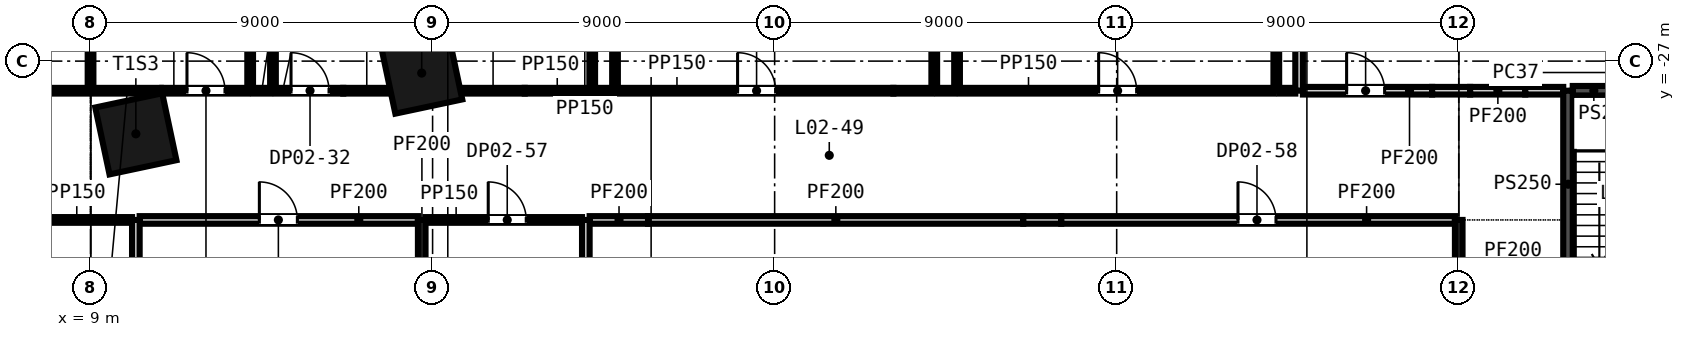
"""IFC4 building model, lengths in metres.
Left out: names, types, materials, properties, quantities, classifications, styles, units other than length and angle.
Written with IfcOpenShell. Run it as: python <this file> out.ifc"""

import sys

from ifc_helpers import new_model, si_unit, direction, frame, frame_2d, origin, origin_2d, place, context, subcontext, project, spatial, rectangle, extrude, element, fill, save


model = new_model("IFC4")
c1 = context("Model", 3, precision=1e-05, world=origin(), true_north=direction((0.0, 1.0)))
c2 = subcontext(c1, "Body", "Model", "MODEL_VIEW")
j1 = project(units=[si_unit("LENGTHUNIT", "METRE"), si_unit("PLANEANGLEUNIT", "RADIAN")], contexts=[c1])
p1 = place(None, origin())
s1 = spatial("IfcSite", under=j1, at=p1, CompositionType="ELEMENT")
p2 = place(p1, origin())
s2 = spatial("IfcBuilding", under=s1, at=p2, CompositionType="ELEMENT")
p3 = place(p2, frame((0.0, 0.0, 18.0)))
s3 = spatial("IfcBuildingStorey", under=s2, at=p3, CompositionType="ELEMENT", Elevation=18.0)
for number, where, z_axis, x_axis in (
    (1, (10.192, -28.914, -0.4), (0.0, 0.0, 1.0), (0.978, 0.208, 0.0)),
    (2, (17.714, -27.315, -0.4), (0.0, 0.0, 1.0), (0.978, 0.208, 0.0)),
):
    element("IfcColumn", number, at=place(p3, frame(where, z_axis=z_axis, x_axis=x_axis)), inside=s3, PredefinedType="COLUMN", context=c2, shape_type="SweptSolid", body=[
        extrude(rectangle(XDim=1.8, YDim=1.8, at=origin_2d()), origin(), (0.0, 0.0, 1.0), 4.6),
    ])
p4 = place(p3, frame((4.223, -31.179, 0.0), z_axis=(0.0, 0.0, 1.0), x_axis=(1.0, 0.0, 0.0)))
e3 = element("IfcWall", 3, at=p4, inside=s3, PredefinedType="PARTITIONING", context=c2, shape_type="SweptSolid", body=[
    extrude(rectangle(XDim=5.869, YDim=0.15, at=frame_2d((2.935, 0.0))), origin(), (0.0, 0.0, 1.0), 4.2),
])
p5 = place(p4, frame((1.9, 0.0, 0.0)))
e4 = element("IfcOpeningElement", 4, at=p5, cuts=e3, PredefinedType="OPENING", context=c2, shape_type="SweptSolid", body=[
    extrude(rectangle(XDim=1.0, YDim=2.1, at=frame_2d((0.5, 1.05))), frame((0.0, 0.085, 0.0), z_axis=(0.0, -1.0, 0.0), x_axis=(1.0, 0.0, 0.0)), (0.0, 0.0, 1.0), 0.17),
])
p6 = place(p3, frame((10.292, -31.179, 0.0), z_axis=(0.0, 0.0, 1.0), x_axis=(1.0, 0.0, 0.0)))
e5 = element("IfcWall", 5, at=p6, inside=s3, PredefinedType="PARTITIONING", context=c2, shape_type="SweptSolid", body=[
    extrude(rectangle(XDim=7.322, YDim=0.2, at=frame_2d((3.661, 0.0))), origin(), (0.0, 0.0, 1.0), 4.2),
])
p7 = place(p6, frame((3.15, 0.0, 0.0)))
e6 = element("IfcOpeningElement", 6, at=p7, cuts=e5, PredefinedType="OPENING", context=c2, shape_type="SweptSolid", body=[
    extrude(rectangle(XDim=1.0, YDim=2.1, at=frame_2d((0.5, 1.05))), frame((0.0, 0.11, 0.0), z_axis=(0.0, -1.0, 0.0), x_axis=(1.0, 0.0, 0.0)), (0.0, 0.0, 1.0), 0.22),
])
p8 = place(p3, frame((17.814, -31.179, 0.0), z_axis=(0.0, 0.0, 1.0), x_axis=(1.0, 0.0, 0.0)))
e7 = element("IfcWall", 7, at=p8, inside=s3, PredefinedType="PARTITIONING", context=c2, shape_type="SweptSolid", body=[
    extrude(rectangle(XDim=4.118, YDim=0.15, at=frame_2d((2.059, 0.0))), origin(), (0.0, 0.0, 1.0), 4.2),
])
p9 = place(p8, frame((1.65, 0.0, 0.0)))
e8 = element("IfcOpeningElement", 8, at=p9, cuts=e7, PredefinedType="OPENING", context=c2, shape_type="SweptSolid", body=[
    extrude(rectangle(XDim=1.0, YDim=2.1, at=frame_2d((0.5, 1.05))), frame((0.0, 0.085, 0.0), z_axis=(0.0, -1.0, 0.0), x_axis=(1.0, 0.0, 0.0)), (0.0, 0.0, 1.0), 0.17),
])
p10 = place(p3, frame((22.132, -31.179, 0.0), z_axis=(0.0, 0.0, 1.0), x_axis=(1.0, 0.0, 0.0)))
e9 = element("IfcWall", 9, at=p10, inside=s3, PredefinedType="PARTITIONING", context=c2, shape_type="SweptSolid", body=[
    extrude(rectangle(XDim=1.537, YDim=0.2, at=frame_2d((0.769, 0.0))), origin(), (0.0, 0.0, 1.0), 3.111),
])
p11 = place(p3, frame((23.669, -31.179, 0.0), z_axis=(0.0, 0.0, 1.0), x_axis=(1.0, 0.0, 0.0)))
e10 = element("IfcWall", 10, at=p11, inside=s3, PredefinedType="PARTITIONING", context=c2, shape_type="SweptSolid", body=[
    extrude(rectangle(XDim=9.873, YDim=0.2, at=frame_2d((4.937, 0.0))), origin(), (0.0, 0.0, 1.0), 4.2),
])
p12 = place(p3, frame((33.542, -31.179, 0.0), z_axis=(0.0, 0.0, 1.0), x_axis=(1.0, 0.0, 0.0)))
e11 = element("IfcWall", 11, at=p12, inside=s3, PredefinedType="PARTITIONING", context=c2, shape_type="SweptSolid", body=[
    extrude(rectangle(XDim=1.0, YDim=0.2, at=frame_2d((0.5, 0.0))), origin(), (0.0, 0.0, 1.0), 3.111),
])
p13 = place(p3, frame((34.542, -31.179, 0.0), z_axis=(0.0, 0.0, 1.0), x_axis=(1.0, 0.0, 0.0)))
e12 = element("IfcWall", 12, at=p13, inside=s3, PredefinedType="PARTITIONING", context=c2, shape_type="SweptSolid", body=[
    extrude(rectangle(XDim=10.358, YDim=0.2, at=frame_2d((5.179, 0.0))), origin(), (0.0, 0.0, 1.0), 4.2),
])
p14 = place(p13, frame((4.65, 0.0, 0.0)))
e13 = element("IfcOpeningElement", 13, at=p14, cuts=e12, PredefinedType="OPENING", context=c2, shape_type="SweptSolid", body=[
    extrude(rectangle(XDim=1.0, YDim=2.1, at=frame_2d((0.5, 1.05))), frame((0.0, 0.11, 0.0), z_axis=(0.0, -1.0, 0.0), x_axis=(1.0, 0.0, 0.0)), (0.0, 0.0, 1.0), 0.22),
])
p15 = place(p3, frame((0.75, -27.779, 0.0), z_axis=(0.0, 0.0, 1.0), x_axis=(1.0, 0.0, 0.0)))
e14 = element("IfcWall", 14, at=p15, inside=s3, PredefinedType="PARTITIONING", context=c2, shape_type="SweptSolid", body=[
    extrude(rectangle(XDim=8.175, YDim=0.15, at=frame_2d((4.087, 0.0))), origin(), (0.0, 0.0, 1.0), 4.2),
])
p16 = place(p3, frame((9.075, -27.779, 0.0), z_axis=(0.0, 0.0, 1.0), x_axis=(1.0, 0.0, 0.0)))
e15 = element("IfcWall", 15, at=p16, inside=s3, PredefinedType="PARTITIONING", context=c2, shape_type="SweptSolid", body=[
    extrude(rectangle(XDim=1.773, YDim=0.15, at=frame_2d((0.886, 0.0))), origin(), (0.0, 0.0, 1.0), 4.2),
])
p17 = place(p3, frame((10.887, -27.779, 0.0), z_axis=(0.0, 0.0, 1.0), x_axis=(1.0, 0.0, 0.0)))
e16 = element("IfcWall", 16, at=p17, inside=s3, PredefinedType="PARTITIONING", context=c2, shape_type="SweptSolid", body=[
    extrude(rectangle(XDim=2.238, YDim=0.15, at=frame_2d((1.119, 0.0))), origin(), (0.0, 0.0, 1.0), 4.2),
])
p18 = place(p17, frame((0.65, 0.0, 0.0)))
e17 = element("IfcOpeningElement", 17, at=p18, cuts=e16, PredefinedType="OPENING", context=c2, shape_type="SweptSolid", body=[
    extrude(rectangle(XDim=1.0, YDim=2.1, at=frame_2d((0.5, 1.05))), frame((0.0, 0.085, 0.0), z_axis=(0.0, -1.0, 0.0), x_axis=(1.0, 0.0, 0.0)), (0.0, 0.0, 1.0), 0.17),
])
p19 = place(p3, frame((13.275, -27.779, 0.0), z_axis=(0.0, 0.0, 1.0), x_axis=(1.0, 0.0, 0.0)))
e18 = element("IfcWall", 18, at=p19, inside=s3, PredefinedType="PARTITIONING", context=c2, shape_type="SweptSolid", body=[
    extrude(rectangle(XDim=0.45, YDim=0.15, at=frame_2d((0.225, 0.0))), origin(), (0.0, 0.0, 1.0), 4.2),
])
p20 = place(p3, frame((13.875, -27.779, 0.0), z_axis=(0.0, 0.0, 1.0), x_axis=(1.0, 0.0, 0.0)))
e19 = element("IfcWall", 19, at=p20, inside=s3, PredefinedType="PARTITIONING", context=c2, shape_type="SweptSolid", body=[
    extrude(rectangle(XDim=1.775, YDim=0.15, at=frame_2d((0.887, 0.0))), origin(), (0.0, 0.0, 1.0), 4.2),
])
p21 = place(p20, frame((0.4, 0.0, 0.0)))
e20 = element("IfcOpeningElement", 20, at=p21, cuts=e19, PredefinedType="OPENING", context=c2, shape_type="SweptSolid", body=[
    extrude(rectangle(XDim=1.0, YDim=2.1, at=frame_2d((0.5, 1.05))), frame((0.0, 0.085, 0.0), z_axis=(0.0, -1.0, 0.0), x_axis=(1.0, 0.0, 0.0)), (0.0, 0.0, 1.0), 0.17),
])
p22 = place(p3, frame((15.65, -27.779, 0.0), z_axis=(0.0, 0.0, 1.0), x_axis=(1.0, 0.0, 0.0)))
e21 = element("IfcWall", 21, at=p22, inside=s3, PredefinedType="PARTITIONING", context=c2, shape_type="SweptSolid", body=[
    extrude(rectangle(XDim=1.227, YDim=0.15, at=frame_2d((0.613, 0.0))), origin(), (0.0, 0.0, 1.0), 3.2),
])
p23 = place(p3, frame((18.748, -27.779, 0.0), z_axis=(0.0, 0.0, 1.0), x_axis=(1.0, 0.0, 0.0)))
e22 = element("IfcWall", 22, at=p23, inside=s3, PredefinedType="PARTITIONING", context=c2, shape_type="SweptSolid", body=[
    extrude(rectangle(XDim=1.676, YDim=0.15, at=frame_2d((0.838, 0.0))), origin(), (0.0, 0.0, 1.0), 4.2),
])
p24 = place(p3, frame((20.425, -27.779, 0.0), z_axis=(0.0, 0.0, 1.0), x_axis=(1.0, 0.0, 0.0)))
e23 = element("IfcWall", 23, at=p24, inside=s3, PredefinedType="PARTITIONING", context=c2, shape_type="SweptSolid", body=[
    extrude(rectangle(XDim=1.7, YDim=0.15, at=frame_2d((0.85, 0.0))), origin(), (0.0, 0.0, 1.0), 3.111),
])
p25 = place(p3, frame((22.275, -27.779, 0.0), z_axis=(0.0, 0.0, 1.0), x_axis=(1.0, 0.0, 0.0)))
e24 = element("IfcWall", 24, at=p25, inside=s3, PredefinedType="PARTITIONING", context=c2, shape_type="SweptSolid", body=[
    extrude(rectangle(XDim=0.45, YDim=0.15, at=frame_2d((0.225, 0.0))), origin(), (0.0, 0.0, 1.0), 4.2),
])
p26 = place(p3, frame((22.875, -27.779, 0.0), z_axis=(0.0, 0.0, 1.0), x_axis=(1.0, 0.0, 0.0)))
e25 = element("IfcWall", 25, at=p26, inside=s3, PredefinedType="PARTITIONING", context=c2, shape_type="SweptSolid", body=[
    extrude(rectangle(XDim=7.25, YDim=0.15, at=frame_2d((3.625, 0.0))), origin(), (0.0, 0.0, 1.0), 4.2),
])
p27 = place(p26, frame((3.15, 0.0, 0.0)))
e26 = element("IfcOpeningElement", 26, at=p27, cuts=e25, PredefinedType="OPENING", context=c2, shape_type="SweptSolid", body=[
    extrude(rectangle(XDim=1.0, YDim=2.1, at=frame_2d((0.5, 1.05))), frame((0.0, 0.085, 0.0), z_axis=(0.0, -1.0, 0.0), x_axis=(1.0, 0.0, 0.0)), (0.0, 0.0, 1.0), 0.17),
])
p28 = place(p3, frame((30.125, -27.779, 0.0), z_axis=(0.0, 0.0, 1.0), x_axis=(1.0, 0.0, 0.0)))
e27 = element("IfcWall", 27, at=p28, inside=s3, PredefinedType="PARTITIONING", context=c2, shape_type="SweptSolid", body=[
    extrude(rectangle(XDim=1.0, YDim=0.15, at=frame_2d((0.5, 0.0))), origin(), (0.0, 0.0, 1.0), 3.111),
])
p29 = place(p3, frame((31.275, -27.779, 0.0), z_axis=(0.0, 0.0, 1.0), x_axis=(1.0, 0.0, 0.0)))
e28 = element("IfcWall", 28, at=p29, inside=s3, PredefinedType="PARTITIONING", context=c2, shape_type="SweptSolid", body=[
    extrude(rectangle(XDim=0.45, YDim=0.15, at=frame_2d((0.225, 0.0))), origin(), (0.0, 0.0, 1.0), 4.2),
])
p30 = place(p3, frame((31.875, -27.779, 0.0), z_axis=(0.0, 0.0, 1.0), x_axis=(1.0, 0.0, 0.0)))
e29 = element("IfcWall", 29, at=p30, inside=s3, PredefinedType="PARTITIONING", context=c2, shape_type="SweptSolid", body=[
    extrude(rectangle(XDim=8.25, YDim=0.15, at=frame_2d((4.125, 0.0))), origin(), (0.0, 0.0, 1.0), 4.2),
])
p31 = place(p30, frame((3.65, 0.0, 0.0)))
e30 = element("IfcOpeningElement", 30, at=p31, cuts=e29, PredefinedType="OPENING", context=c2, shape_type="SweptSolid", body=[
    extrude(rectangle(XDim=1.0, YDim=2.1, at=frame_2d((0.5, 1.05))), frame((0.0, 0.085, 0.0), z_axis=(0.0, -1.0, 0.0), x_axis=(1.0, 0.0, 0.0)), (0.0, 0.0, 1.0), 0.17),
])
p32 = place(p3, frame((40.275, -27.779, 0.0), z_axis=(0.0, 0.0, 1.0), x_axis=(1.0, 0.0, 0.0)))
e31 = element("IfcWall", 31, at=p32, inside=s3, PredefinedType="PARTITIONING", context=c2, shape_type="SweptSolid", body=[
    extrude(rectangle(XDim=0.425, YDim=0.15, at=frame_2d((0.212, 0.0))), origin(), (0.0, 0.0, 1.0), 4.2),
])
p33 = place(p3, frame((40.9, -27.779, 0.0), z_axis=(0.0, 0.0, 1.0), x_axis=(1.0, 0.0, 0.0)))
e32 = element("IfcWall", 32, at=p33, inside=s3, PredefinedType="PARTITIONING", context=c2, shape_type="SweptSolid", body=[
    extrude(rectangle(XDim=3.4, YDim=0.2, at=frame_2d((1.7, 0.0))), origin(), (0.0, 0.0, 1.0), 4.2),
])
p34 = place(p33, frame((1.15, 0.0, 0.0)))
e33 = element("IfcOpeningElement", 33, at=p34, cuts=e32, PredefinedType="OPENING", context=c2, shape_type="SweptSolid", body=[
    extrude(rectangle(XDim=1.0, YDim=2.1, at=frame_2d((0.5, 1.05))), frame((0.0, 0.11, 0.0), z_axis=(0.0, -1.0, 0.0), x_axis=(1.0, 0.0, 0.0)), (0.0, 0.0, 1.0), 0.22),
])
p35 = place(p3, frame((44.3, -27.779, 0.0), z_axis=(0.0, 0.0, 1.0), x_axis=(1.0, 0.0, 0.0)))
e34 = element("IfcWall", 34, at=p35, inside=s3, PredefinedType="PARTITIONING", context=c2, shape_type="SweptSolid", body=[
    extrude(rectangle(XDim=1.0, YDim=0.2, at=frame_2d((0.5, 0.0))), origin(), (0.0, 0.0, 1.0), 3.597),
])
p36 = place(p3, frame((45.3, -27.779, 0.0), z_axis=(0.0, 0.0, 1.0), x_axis=(1.0, 0.0, 0.0)))
e35 = element("IfcWall", 35, at=p36, inside=s3, PredefinedType="PARTITIONING", context=c2, shape_type="SweptSolid", body=[
    extrude(rectangle(XDim=1.45, YDim=0.2, at=frame_2d((0.725, 0.0))), origin(), (0.0, 0.0, 1.0), 4.2),
])
p37 = place(p3, frame((46.75, -27.779, 0.0), z_axis=(0.0, 0.0, 1.0), x_axis=(1.0, 0.0, 0.0)))
e36 = element("IfcWall", 36, at=p37, inside=s3, PredefinedType="PARTITIONING", context=c2, shape_type="SweptSolid", body=[
    extrude(rectangle(XDim=1.0, YDim=0.2, at=frame_2d((0.5, 0.0))), origin(), (0.0, 0.0, 1.0), 3.667),
])
p38 = place(p3, frame((48.0, -27.779, 0.0), z_axis=(0.0, 0.0, 1.0), x_axis=(1.0, 0.0, 0.0)))
e37 = element("IfcWall", 37, at=p38, inside=s3, PredefinedType="SHEAR", context=c2, shape_type="SweptSolid", body=[
    extrude(rectangle(XDim=1.1, YDim=0.25, at=frame_2d((0.55, 0.0))), origin(), (0.0, 0.0, 1.0), 4.2),
])
p39 = place(p3, frame((9.0, -27.778, 0.0), z_axis=(0.0, 0.0, 1.0), x_axis=(0.0, 1.0, 0.0)))
e38 = element("IfcWall", 38, at=p39, inside=s3, PredefinedType="PARTITIONING", context=c2, shape_type="SweptSolid", body=[
    extrude(rectangle(XDim=3.825, YDim=0.15, at=frame_2d((1.913, 0.0))), origin(), (0.0, 0.0, 1.0), 4.2),
])
p40 = place(p3, frame((10.192, -40.4, 0.0), z_axis=(0.0, 0.0, 1.0), x_axis=(0.0, 1.0, 0.0)))
e39 = element("IfcWall", 39, at=p40, inside=s3, PredefinedType="PARTITIONING", context=c2, shape_type="SweptSolid", body=[
    extrude(rectangle(XDim=9.221, YDim=0.2, at=frame_2d((4.61, 0.0))), origin(), (0.0, 0.0, 1.0), 4.2),
])
for number, where, z_axis, x_axis in (
    (40, (13.2, -27.778, 0.0), (0.0, 0.0, 1.0), (0.0, 1.0, 0.0)),
    (41, (13.8, -27.778, 0.0), (0.0, 0.0, 1.0), (0.0, 1.0, 0.0)),
):
    element("IfcWall", number, at=place(p3, frame(where, z_axis=z_axis, x_axis=x_axis)), inside=s3, PredefinedType="PARTITIONING", context=c2, shape_type="SweptSolid", body=[
        extrude(rectangle(XDim=1.578, YDim=0.15, at=frame_2d((0.789, 0.0))), origin(), (0.0, 0.0, 1.0), 4.2),
    ])
p41 = place(p3, frame((17.714, -37.835, 0.0), z_axis=(0.0, 0.0, 1.0), x_axis=(0.0, 1.0, 0.0)))
e42 = element("IfcWall", 42, at=p41, inside=s3, PredefinedType="PARTITIONING", context=c2, shape_type="SweptSolid", body=[
    extrude(rectangle(XDim=6.656, YDim=0.2, at=frame_2d((3.328, 0.0))), origin(), (0.0, 0.0, 1.0), 4.2),
])
p42 = place(p3, frame((22.032, -40.4, 0.0), z_axis=(0.0, 0.0, 1.0), x_axis=(0.0, 1.0, 0.0)))
e43 = element("IfcWall", 43, at=p42, inside=s3, PredefinedType="PARTITIONING", context=c2, shape_type="SweptSolid", body=[
    extrude(rectangle(XDim=9.221, YDim=0.2, at=frame_2d((4.61, 0.0))), origin(), (0.0, 0.0, 1.0), 4.2),
])
for number, where, z_axis, x_axis in (
    (44, (22.2, -27.778, 0.0), (0.0, 0.0, 1.0), (0.0, 1.0, 0.0)),
    (45, (22.8, -27.778, 0.0), (0.0, 0.0, 1.0), (0.0, 1.0, 0.0)),
    (46, (31.2, -27.778, 0.0), (0.0, 0.0, 1.0), (0.0, 1.0, 0.0)),
    (47, (31.8, -27.778, 0.0), (0.0, 0.0, 1.0), (0.0, 1.0, 0.0)),
    (48, (40.2, -27.778, 0.0), (0.0, 0.0, 1.0), (0.0, 1.0, 0.0)),
):
    element("IfcWall", number, at=place(p3, frame(where, z_axis=z_axis, x_axis=x_axis)), inside=s3, PredefinedType="PARTITIONING", context=c2, shape_type="SweptSolid", body=[
        extrude(rectangle(XDim=1.578, YDim=0.15, at=frame_2d((0.789, 0.0))), origin(), (0.0, 0.0, 1.0), 4.2),
    ])
p43 = place(p3, frame((40.8, -27.778, 0.0), z_axis=(0.0, 0.0, 1.0), x_axis=(0.0, 1.0, 0.0)))
e49 = element("IfcWall", 49, at=p43, inside=s3, PredefinedType="PARTITIONING", context=c2, shape_type="SweptSolid", body=[
    extrude(rectangle(XDim=1.578, YDim=0.2, at=frame_2d((0.789, 0.0))), origin(), (0.0, 0.0, 1.0), 4.2),
])
p44 = place(p3, frame((45.0, -34.6, 0.0), z_axis=(0.0, 0.0, 1.0), x_axis=(0.0, 1.0, 0.0)))
e50 = element("IfcWall", 50, at=p44, inside=s3, PredefinedType="PARTITIONING", context=c2, shape_type="SweptSolid", body=[
    extrude(rectangle(XDim=3.421, YDim=0.2, at=frame_2d((1.71, 0.0))), origin(), (0.0, 0.0, 1.0), 4.2),
])
p45 = place(p3, frame((47.875, -34.6, 0.0), z_axis=(0.0, 0.0, 1.0), x_axis=(0.0, 1.0, 0.0)))
e51 = element("IfcWall", 51, at=p45, inside=s3, PredefinedType="SHEAR", context=c2, shape_type="SweptSolid", body=[
    extrude(rectangle(XDim=6.821, YDim=0.25, at=frame_2d((3.411, 0.0))), origin(), (0.0, 0.0, 1.0), 4.2),
])
p46 = place(p45, frame((0.65, 0.0, 0.0)))
e52 = element("IfcOpeningElement", 52, at=p46, cuts=e51, PredefinedType="OPENING", context=c2, shape_type="SweptSolid", body=[
    extrude(rectangle(XDim=1.2, YDim=2.1, at=frame_2d((0.6, 1.05))), frame((0.0, 0.135, 0.0), z_axis=(0.0, -1.0, 0.0), x_axis=(1.0, 0.0, 0.0)), (0.0, 0.0, 1.0), 0.27),
])
p47 = place(p18, origin())
e53 = element("IfcDoor", 53, at=p47, inside=s3, OperationType="SINGLE_SWING_LEFT", PredefinedType="DOOR", context=c2, shape_type="SweptSolid", body=[
    extrude(rectangle(XDim=1.0, YDim=2.1, at=frame_2d((0.5, 1.05))), frame((0.0, 0.025, 0.0), z_axis=(0.0, -1.0, 0.0), x_axis=(1.0, 0.0, 0.0)), (0.0, 0.0, 1.0), 0.05),
])
fill(e17, e53)
p48 = place(p21, origin())
e54 = element("IfcDoor", 54, at=p48, inside=s3, OperationType="SINGLE_SWING_LEFT", PredefinedType="DOOR", context=c2, shape_type="SweptSolid", body=[
    extrude(rectangle(XDim=1.0, YDim=2.1, at=frame_2d((0.5, 1.05))), frame((0.0, 0.025, 0.0), z_axis=(0.0, -1.0, 0.0), x_axis=(1.0, 0.0, 0.0)), (0.0, 0.0, 1.0), 0.05),
])
fill(e20, e54)
p49 = place(p27, origin())
e55 = element("IfcDoor", 55, at=p49, inside=s3, OperationType="SINGLE_SWING_LEFT", PredefinedType="DOOR", context=c2, shape_type="SweptSolid", body=[
    extrude(rectangle(XDim=1.0, YDim=2.1, at=frame_2d((0.5, 1.05))), frame((0.0, 0.025, 0.0), z_axis=(0.0, -1.0, 0.0), x_axis=(1.0, 0.0, 0.0)), (0.0, 0.0, 1.0), 0.05),
])
fill(e26, e55)
p50 = place(p31, origin())
e56 = element("IfcDoor", 56, at=p50, inside=s3, OperationType="SINGLE_SWING_LEFT", PredefinedType="DOOR", context=c2, shape_type="SweptSolid", body=[
    extrude(rectangle(XDim=1.0, YDim=2.1, at=frame_2d((0.5, 1.05))), frame((0.0, 0.025, 0.0), z_axis=(0.0, -1.0, 0.0), x_axis=(1.0, 0.0, 0.0)), (0.0, 0.0, 1.0), 0.05),
])
fill(e30, e56)
p51 = place(p34, origin())
e57 = element("IfcDoor", 57, at=p51, inside=s3, OperationType="SINGLE_SWING_LEFT", PredefinedType="DOOR", context=c2, shape_type="SweptSolid", body=[
    extrude(rectangle(XDim=1.0, YDim=2.1, at=frame_2d((0.5, 1.05))), frame((0.0, 0.025, 0.0), z_axis=(0.0, -1.0, 0.0), x_axis=(1.0, 0.0, 0.0)), (0.0, 0.0, 1.0), 0.05),
])
fill(e33, e57)
p52 = place(p7, origin())
e58 = element("IfcDoor", 58, at=p52, inside=s3, OperationType="SINGLE_SWING_LEFT", PredefinedType="DOOR", context=c2, shape_type="SweptSolid", body=[
    extrude(rectangle(XDim=1.0, YDim=2.1, at=frame_2d((0.5, 1.05))), frame((0.0, 0.025, 0.0), z_axis=(0.0, -1.0, 0.0), x_axis=(1.0, 0.0, 0.0)), (0.0, 0.0, 1.0), 0.05),
])
fill(e6, e58)
p53 = place(p9, origin())
e59 = element("IfcDoor", 59, at=p53, inside=s3, OperationType="SINGLE_SWING_LEFT", PredefinedType="DOOR", context=c2, shape_type="SweptSolid", body=[
    extrude(rectangle(XDim=1.0, YDim=2.1, at=frame_2d((0.5, 1.05))), frame((0.0, 0.025, 0.0), z_axis=(0.0, -1.0, 0.0), x_axis=(1.0, 0.0, 0.0)), (0.0, 0.0, 1.0), 0.05),
])
fill(e8, e59)
p54 = place(p14, origin())
e60 = element("IfcDoor", 60, at=p54, inside=s3, OperationType="SINGLE_SWING_LEFT", PredefinedType="DOOR", context=c2, shape_type="SweptSolid", body=[
    extrude(rectangle(XDim=1.0, YDim=2.1, at=frame_2d((0.5, 1.05))), frame((0.0, 0.025, 0.0), z_axis=(0.0, -1.0, 0.0), x_axis=(1.0, 0.0, 0.0)), (0.0, 0.0, 1.0), 0.05),
])
fill(e13, e60)
save(model, sys.argv[1])
